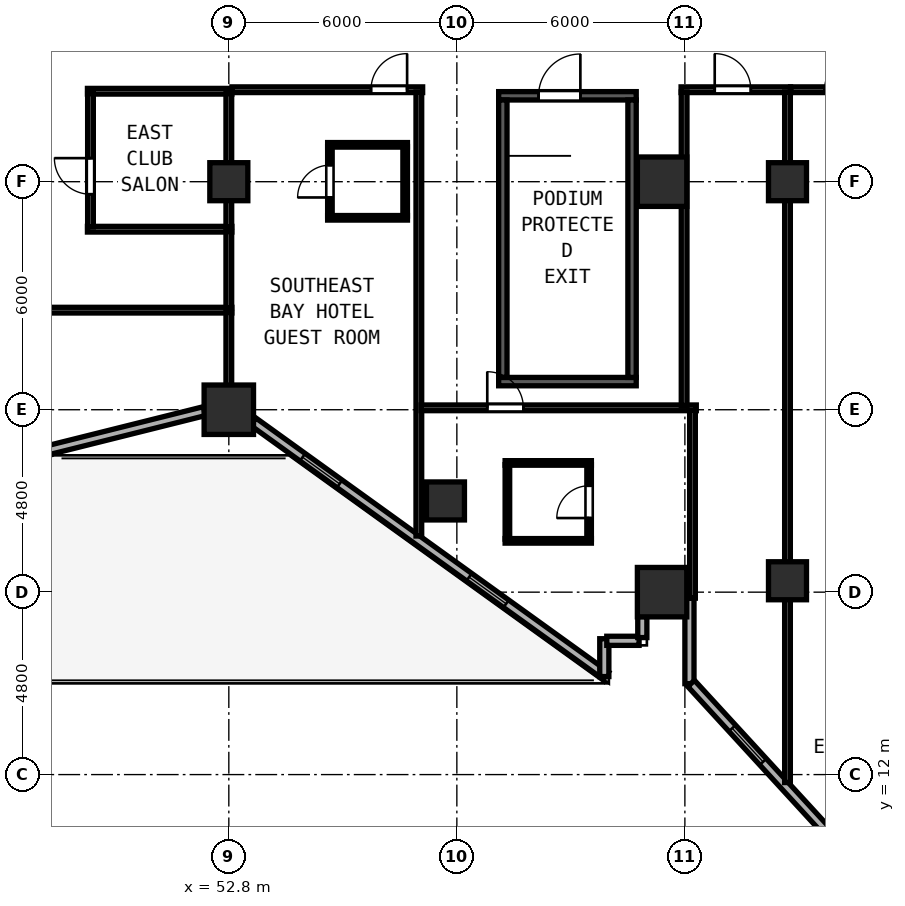
"""IFC4 building model, lengths in metres.
Left out: names, types, materials, properties, quantities, classifications, styles, units other than length and angle.
Written with IfcOpenShell. Run it as: python <this file> out.ifc"""

import sys

from ifc_helpers import new_model, si_unit, direction, frame, frame_2d, origin, origin_2d, place, context, subcontext, project, spatial, rectangle, hollow_rectangle, extrude, element, fill, save


model = new_model("IFC4")
c1 = context("Model", 3, precision=1e-05, world=origin(), true_north=direction((0.0, 1.0)))
c2 = subcontext(c1, "Body", "Model", "MODEL_VIEW")
j1 = project(units=[si_unit("LENGTHUNIT", "METRE"), si_unit("PLANEANGLEUNIT", "RADIAN")], contexts=[c1])
p1 = place(None, origin())
s1 = spatial("IfcSite", under=j1, at=p1, CompositionType="ELEMENT")
p2 = place(p1, origin())
s2 = spatial("IfcBuilding", under=s1, at=p2, CompositionType="ELEMENT")
p3 = place(p2, frame((0.0, 0.0, 24.0)))
s3 = spatial("IfcBuildingStorey", under=s2, at=p3, CompositionType="ELEMENT", Elevation=24.0)
p4 = place(p3, frame((59.9, 29.86, 0.0), z_axis=(0.0, 0.0, 1.0), x_axis=(1.0, 0.0, 0.0)))
e1 = element("IfcWall", 1, at=p4, inside=s3, PredefinedType="SHEAR", context=c2, shape_type="SweptSolid", body=[
    extrude(rectangle(XDim=3.62, YDim=0.22, at=frame_2d((1.81, 0.0))), origin(), (0.0, 0.0, 1.0), 3.6),
])
p5 = place(p4, frame((1.05, 0.0, 0.0)))
e2 = element("IfcOpeningElement", 2, at=p5, cuts=e1, PredefinedType="OPENING", context=c2, shape_type="SweptSolid", body=[
    extrude(rectangle(XDim=1.1, YDim=2.15, at=frame_2d((0.55, 1.075))), frame((0.0, 0.12, 0.0), z_axis=(0.0, -1.0, 0.0), x_axis=(1.0, 0.0, 0.0)), (0.0, 0.0, 1.0), 0.24),
])
p6 = place(p3, frame((59.9, 22.34, 0.0), z_axis=(0.0, 0.0, 1.0), x_axis=(1.0, 0.0, 0.0)))
e3 = element("IfcWall", 3, at=p6, inside=s3, PredefinedType="SHEAR", context=c2, shape_type="SweptSolid", body=[
    extrude(rectangle(XDim=3.62, YDim=0.22, at=frame_2d((1.81, 0.0))), origin(), (0.0, 0.0, 1.0), 3.6),
])
for number, where, z_axis, x_axis in (
    (4, (60.01, 22.45, 0.0), (0.0, 0.0, 1.0), (0.0, 1.0, 0.0)),
    (5, (63.41, 22.45, 0.0), (0.0, 0.0, 1.0), (0.0, 1.0, 0.0)),
):
    element("IfcWall", number, at=place(p3, frame(where, z_axis=z_axis, x_axis=x_axis)), inside=s3, PredefinedType="SHEAR", context=c2, shape_type="SweptSolid", body=[
        extrude(rectangle(XDim=7.3, YDim=0.22, at=frame_2d((3.65, 0.0))), origin(), (0.0, 0.0, 1.0), 3.6),
    ])
for number, where, z_axis, x_axis in (
    (6, (52.8, 21.6, 0.0), (0.0, 0.0, 1.0), (1.0, 0.0, 0.0)),
    (7, (64.2, 16.8, 0.0), (0.0, 0.0, 1.0), (1.0, 0.0, 0.0)),
    (8, (64.2, 27.6, 0.0), (0.0, 0.0, 1.0), (1.0, 0.0, 0.0)),
):
    element("IfcColumn", number, at=place(p3, frame(where, z_axis=z_axis, x_axis=x_axis)), inside=s3, PredefinedType="COLUMN", context=c2, shape_type="SweptSolid", body=[
        extrude(hollow_rectangle(XDim=1.3, YDim=1.3, WallThickness=0.048, at=origin_2d()), origin(), (0.0, 0.0, 1.0), 3.8),
    ])
for number, where, z_axis, x_axis in (
    (9, (52.8, 27.6, -0.26), (0.0, 0.0, 1.0), (1.0, 0.0, 0.0)),
    (10, (58.5, 19.2, -0.26), (0.0, 0.0, 1.0), (1.0, 0.0, 0.0)),
    (11, (67.5, 17.1, -0.26), (0.0, 0.0, 1.0), (1.0, 0.0, 0.0)),
    (12, (67.5, 27.6, -0.26), (0.0, 0.0, 1.0), (1.0, 0.0, 0.0)),
):
    element("IfcColumn", number, at=place(p3, frame(where, z_axis=z_axis, x_axis=x_axis)), inside=s3, PredefinedType="COLUMN", context=c2, shape_type="SweptSolid", body=[
        extrude(hollow_rectangle(XDim=1.0, YDim=1.0, WallThickness=0.038, at=origin_2d()), origin(), (0.0, 0.0, 1.0), 4.06),
    ])
p7 = place(p3, frame((47.932, 20.507, 0.0), z_axis=(0.0, 0.0, 1.0), x_axis=(0.970135906278, 0.242561998982, 0.0)))
e13 = element("IfcWall", 13, at=p7, inside=s3, PredefinedType="SOLIDWALL", context=c2, shape_type="SweptSolid", body=[
    extrude(rectangle(XDim=4.356, YDim=0.24, at=frame_2d((2.178, 0.0))), origin(), (0.0, 0.0, 1.0), 3.097),
])
p8 = place(p3, frame((53.442, 21.286, 0.0), z_axis=(0.0, 0.0, 1.0), x_axis=(0.811542842993, -0.584292917967, 0.0)))
e14 = element("IfcWall", 14, at=p8, inside=s3, PredefinedType="SOLIDWALL", context=c2, shape_type="SweptSolid", body=[
    extrude(rectangle(XDim=11.438, YDim=0.24, at=frame_2d((5.719, 0.0))), origin(), (0.0, 0.0, 1.0), 3.097),
])
p9 = place(p8, frame((1.6, 0.0, 0.85)))
e15 = element("IfcOpeningElement", 15, at=p9, cuts=e14, PredefinedType="OPENING", context=c2, shape_type="SweptSolid", body=[
    extrude(rectangle(XDim=1.2, YDim=1.85, at=frame_2d((0.6, 0.925))), frame((0.0, 0.13, 0.0), z_axis=(0.0, -1.0, 0.0), x_axis=(1.0, 0.0, 0.0)), (0.0, 0.0, 1.0), 0.26),
])
p10 = place(p8, frame((7.0, 0.0, 0.85)))
e16 = element("IfcOpeningElement", 16, at=p10, cuts=e14, PredefinedType="OPENING", context=c2, shape_type="SweptSolid", body=[
    extrude(rectangle(XDim=1.2, YDim=1.85, at=frame_2d((0.6, 0.925))), frame((0.0, 0.13, 0.0), z_axis=(0.0, -1.0, 0.0), x_axis=(1.0, 0.0, 0.0)), (0.0, 0.0, 1.0), 0.26),
])
p11 = place(p3, frame((62.68, 14.579, 0.0), z_axis=(0.0, 0.0, 1.0), x_axis=(0.0, 1.0, 0.0)))
e17 = element("IfcWall", 17, at=p11, inside=s3, PredefinedType="SOLIDWALL", context=c2, shape_type="SweptSolid", body=[
    extrude(rectangle(XDim=0.996, YDim=0.24, at=frame_2d((0.498, 0.0))), origin(), (0.0, 0.0, 1.0), 3.6),
])
p12 = place(p3, frame((62.745, 15.52, 0.0), z_axis=(0.0, 0.0, 1.0), x_axis=(1.0, 0.0, 0.0)))
e18 = element("IfcWall", 18, at=p12, inside=s3, PredefinedType="SOLIDWALL", context=c2, shape_type="SweptSolid", body=[
    extrude(rectangle(XDim=0.85, YDim=0.24, at=frame_2d((0.425, 0.0))), origin(), (0.0, 0.0, 1.0), 3.6),
])
p13 = place(p3, frame((63.68, 15.605, 0.0), z_axis=(0.0, 0.0, 1.0), x_axis=(0.0, 1.0, 0.0)))
e19 = element("IfcWall", 19, at=p13, inside=s3, PredefinedType="SOLIDWALL", context=c2, shape_type="SweptSolid", body=[
    extrude(rectangle(XDim=0.553, YDim=0.24, at=frame_2d((0.276, 0.0))), origin(), (0.0, 0.0, 1.0), 3.6),
])
p14 = place(p3, frame((64.92, 16.64, 0.0), z_axis=(0.0, 0.0, 1.0), x_axis=(0.0, -1.0, 0.0)))
e20 = element("IfcWall", 20, at=p14, inside=s3, PredefinedType="SOLIDWALL", context=c2, shape_type="SweptSolid", body=[
    extrude(rectangle(XDim=2.248, YDim=0.24, at=frame_2d((1.124, 0.0))), origin(), (0.0, 0.0, 1.0), 3.6),
])
p15 = place(p3, frame((64.964, 14.399, 0.0), z_axis=(0.0, 0.0, 1.0), x_axis=(0.676144639244, -0.736768910054, 0.0)))
e21 = element("IfcWall", 21, at=p15, inside=s3, PredefinedType="SOLIDWALL", context=c2, shape_type="SweptSolid", body=[
    extrude(rectangle(XDim=9.552, YDim=0.24, at=frame_2d((4.776, 0.0))), origin(), (0.0, 0.0, 1.0), 3.6),
])
p16 = place(p15, frame((1.6, 0.0, 0.85)))
e22 = element("IfcOpeningElement", 22, at=p16, cuts=e21, PredefinedType="OPENING", context=c2, shape_type="SweptSolid", body=[
    extrude(rectangle(XDim=1.2, YDim=1.85, at=frame_2d((0.6, 0.925))), frame((0.0, 0.13, 0.0), z_axis=(0.0, -1.0, 0.0), x_axis=(1.0, 0.0, 0.0)), (0.0, 0.0, 1.0), 0.26),
])
p17 = place(p15, frame((7.0, 0.0, 0.85)))
e23 = element("IfcOpeningElement", 23, at=p17, cuts=e21, PredefinedType="OPENING", context=c2, shape_type="SweptSolid", body=[
    extrude(rectangle(XDim=1.2, YDim=1.85, at=frame_2d((0.6, 0.925))), frame((0.0, 0.13, 0.0), z_axis=(0.0, -1.0, 0.0), x_axis=(1.0, 0.0, 0.0)), (0.0, 0.0, 1.0), 0.26),
])
p18 = place(p3, frame((71.183, 31.078, 0.0), z_axis=(0.0, 0.0, 1.0), x_axis=(-0.936332044214, 0.351115797106, 0.0)))
e24 = element("IfcWall", 24, at=p18, inside=s3, PredefinedType="SOLIDWALL", context=c2, shape_type="SweptSolid", body=[
    extrude(rectangle(XDim=7.0, YDim=0.24, at=frame_2d((3.5, 0.0))), origin(), (0.0, 0.0, 1.0), 3.6),
])
p19 = place(p18, frame((1.6, 0.0, 0.85)))
e25 = element("IfcOpeningElement", 25, at=p19, cuts=e24, PredefinedType="OPENING", context=c2, shape_type="SweptSolid", body=[
    extrude(rectangle(XDim=1.2, YDim=1.85, at=frame_2d((0.6, 0.925))), frame((0.0, 0.13, 0.0), z_axis=(0.0, -1.0, 0.0), x_axis=(1.0, 0.0, 0.0)), (0.0, 0.0, 1.0), 0.26),
])
for number, where, z_axis, x_axis in (
    (26, (49.08, 29.98, 0.0), (0.0, 0.0, 1.0), (1.0, 0.0, 0.0)),
    (27, (49.08, 26.35, 0.0), (0.0, 0.0, 1.0), (1.0, 0.0, 0.0)),
):
    element("IfcWall", number, at=place(p3, frame(where, z_axis=z_axis, x_axis=x_axis)), inside=s3, PredefinedType="PARTITIONING", context=c2, shape_type="SweptSolid", body=[
        extrude(rectangle(XDim=3.8, YDim=0.15, at=frame_2d((1.9, 0.0))), origin(), (0.0, 0.0, 1.0), 3.6),
    ])
p20 = place(p3, frame((49.16, 26.41, 0.0), z_axis=(0.0, 0.0, 1.0), x_axis=(0.0, 1.0, 0.0)))
e28 = element("IfcWall", 28, at=p20, inside=s3, PredefinedType="PARTITIONING", context=c2, shape_type="SweptSolid", body=[
    extrude(rectangle(XDim=3.51, YDim=0.15, at=frame_2d((1.755, 0.0))), origin(), (0.0, 0.0, 1.0), 3.6),
])
p21 = place(p20, frame((0.86, 0.0, 0.0)))
e29 = element("IfcOpeningElement", 29, at=p21, cuts=e28, PredefinedType="OPENING", context=c2, shape_type="SweptSolid", body=[
    extrude(rectangle(XDim=0.95, YDim=2.12, at=frame_2d((0.475, 1.06))), frame((0.0, 0.085, 0.0), z_axis=(0.0, -1.0, 0.0), x_axis=(1.0, 0.0, 0.0)), (0.0, 0.0, 1.0), 0.17),
])
p22 = place(p3, frame((52.8, 26.41, 0.0), z_axis=(0.0, 0.0, 1.0), x_axis=(0.0, 1.0, 0.0)))
e30 = element("IfcWall", 30, at=p22, inside=s3, PredefinedType="PARTITIONING", context=c2, shape_type="SweptSolid", body=[
    extrude(rectangle(XDim=3.51, YDim=0.15, at=frame_2d((1.755, 0.0))), origin(), (0.0, 0.0, 1.0), 3.097),
])
p23 = place(p3, frame((45.682, 24.22, 0.0), z_axis=(0.0, 0.0, 1.0), x_axis=(1.0, 0.0, 0.0)))
e31 = element("IfcWall", 31, at=p23, inside=s3, PredefinedType="PARTITIONING", context=c2, shape_type="SweptSolid", body=[
    extrude(rectangle(XDim=7.198, YDim=0.15, at=frame_2d((3.599, 0.0))), origin(), (0.0, 0.0, 1.0), 3.6),
])
p24 = place(p23, frame((2.143, 0.0, 0.0), z_axis=(0.0, 0.0, 1.0), x_axis=(-1.0, 0.0, 0.0)))
e32 = element("IfcOpeningElement", 32, at=p24, cuts=e31, PredefinedType="OPENING", context=c2, shape_type="SweptSolid", body=[
    extrude(rectangle(XDim=0.95, YDim=2.12, at=frame_2d((0.475, 1.06))), frame((0.0, 0.085, 0.0), z_axis=(0.0, -1.0, 0.0), x_axis=(1.0, 0.0, 0.0)), (0.0, 0.0, 1.0), 0.17),
])
p25 = place(p3, frame((52.8, 21.819, 0.0), z_axis=(0.0, 0.0, 1.0), x_axis=(0.0, 1.0, 0.0)))
e33 = element("IfcWall", 33, at=p25, inside=s3, PredefinedType="PARTITIONING", context=c2, shape_type="SweptSolid", body=[
    extrude(rectangle(XDim=2.341, YDim=0.15, at=frame_2d((1.171, 0.0))), origin(), (0.0, 0.0, 1.0), 3.097),
])
p26 = place(p3, frame((52.882, 30.02, 0.0), z_axis=(0.0, 0.0, 1.0), x_axis=(1.0, 0.0, 0.0)))
e34 = element("IfcWall", 34, at=p26, inside=s3, PredefinedType="PARTITIONING", context=c2, shape_type="SweptSolid", body=[
    extrude(rectangle(XDim=5.018, YDim=0.15, at=frame_2d((2.509, 0.0))), origin(), (0.0, 0.0, 1.0), 3.6),
])
p27 = place(p26, frame((4.609, 0.0, 0.0), z_axis=(0.0, 0.0, 1.0), x_axis=(-1.0, 0.0, 0.0)))
e35 = element("IfcOpeningElement", 35, at=p27, cuts=e34, PredefinedType="OPENING", context=c2, shape_type="SweptSolid", body=[
    extrude(rectangle(XDim=0.95, YDim=2.15, at=frame_2d((0.475, 1.075))), frame((0.0, 0.085, 0.0), z_axis=(0.0, -1.0, 0.0), x_axis=(1.0, 0.0, 0.0)), (0.0, 0.0, 1.0), 0.17),
])
p28 = place(p3, frame((52.8, 24.28, 0.0), z_axis=(0.0, 0.0, 1.0), x_axis=(0.0, 1.0, 0.0)))
e36 = element("IfcWall", 36, at=p28, inside=s3, PredefinedType="PARTITIONING", context=c2, shape_type="SweptSolid", body=[
    extrude(rectangle(XDim=2.01, YDim=0.15, at=frame_2d((1.005, 0.0))), origin(), (0.0, 0.0, 1.0), 3.097),
])
p29 = place(p3, frame((57.8, 18.277, 0.0), z_axis=(0.0, 0.0, 1.0), x_axis=(0.0, 1.0, 0.0)))
e37 = element("IfcWall", 37, at=p29, inside=s3, PredefinedType="PARTITIONING", context=c2, shape_type="SweptSolid", body=[
    extrude(rectangle(XDim=11.683, YDim=0.15, at=frame_2d((5.841, 0.0))), origin(), (0.0, 0.0, 1.0), 3.6),
])
for number, where, z_axis, x_axis in (
    (38, (55.4, 28.57, 0.0), (0.0, 0.0, 1.0), (1.0, 0.0, 0.0)),
    (39, (55.4, 26.65, 0.0), (0.0, 0.0, 1.0), (1.0, 0.0, 0.0)),
):
    element("IfcWall", number, at=place(p3, frame(where, z_axis=z_axis, x_axis=x_axis)), inside=s3, PredefinedType="PARTITIONING", context=c2, shape_type="SweptSolid", body=[
        extrude(rectangle(XDim=2.1, YDim=0.12, at=frame_2d((1.05, 0.0))), origin(), (0.0, 0.0, 1.0), 3.6),
    ])
p30 = place(p3, frame((55.46, 26.695, 0.0), z_axis=(0.0, 0.0, 1.0), x_axis=(0.0, 1.0, 0.0)))
e40 = element("IfcWall", 40, at=p30, inside=s3, PredefinedType="PARTITIONING", context=c2, shape_type="SweptSolid", body=[
    extrude(rectangle(XDim=1.83, YDim=0.12, at=frame_2d((0.915, 0.0))), origin(), (0.0, 0.0, 1.0), 3.6),
])
p31 = place(p30, frame((1.34, 0.0, 0.0), z_axis=(0.0, 0.0, 1.0), x_axis=(-1.0, 0.0, 0.0)))
e41 = element("IfcOpeningElement", 41, at=p31, cuts=e40, PredefinedType="OPENING", context=c2, shape_type="SweptSolid", body=[
    extrude(rectangle(XDim=0.85, YDim=2.1, at=frame_2d((0.425, 1.05))), frame((0.0, 0.07, 0.0), z_axis=(0.0, -1.0, 0.0), x_axis=(1.0, 0.0, 0.0)), (0.0, 0.0, 1.0), 0.14),
])
p32 = place(p3, frame((57.44, 26.695, 0.0), z_axis=(0.0, 0.0, 1.0), x_axis=(0.0, 1.0, 0.0)))
e42 = element("IfcWall", 42, at=p32, inside=s3, PredefinedType="PARTITIONING", context=c2, shape_type="SweptSolid", body=[
    extrude(rectangle(XDim=1.83, YDim=0.12, at=frame_2d((0.915, 0.0))), origin(), (0.0, 0.0, 1.0), 3.6),
])
p33 = place(p3, frame((57.86, 21.65, 0.0), z_axis=(0.0, 0.0, 1.0), x_axis=(1.0, 0.0, 0.0)))
e43 = element("IfcWall", 43, at=p33, inside=s3, PredefinedType="PARTITIONING", context=c2, shape_type="SweptSolid", body=[
    extrude(rectangle(XDim=7.24, YDim=0.15, at=frame_2d((3.62, 0.0))), origin(), (0.0, 0.0, 1.0), 3.6),
])
p34 = place(p33, frame((2.69, 0.0, 0.0), z_axis=(0.0, 0.0, 1.0), x_axis=(-1.0, 0.0, 0.0)))
e44 = element("IfcOpeningElement", 44, at=p34, cuts=e43, PredefinedType="OPENING", context=c2, shape_type="SweptSolid", body=[
    extrude(rectangle(XDim=0.95, YDim=2.15, at=frame_2d((0.475, 1.075))), frame((0.0, 0.085, 0.0), z_axis=(0.0, -1.0, 0.0), x_axis=(1.0, 0.0, 0.0)), (0.0, 0.0, 1.0), 0.17),
])
p35 = place(p3, frame((65.0, 16.642, 0.0), z_axis=(0.0, 0.0, 1.0), x_axis=(0.0, 1.0, 0.0)))
e45 = element("IfcWall", 45, at=p35, inside=s3, PredefinedType="PARTITIONING", context=c2, shape_type="SweptSolid", body=[
    extrude(rectangle(XDim=4.948, YDim=0.15, at=frame_2d((2.474, 0.0))), origin(), (0.0, 0.0, 1.0), 3.6),
])
for number, where, z_axis, x_axis in (
    (46, (60.07, 20.2, 0.0), (0.0, 0.0, 1.0), (1.0, 0.0, 0.0)),
    (47, (60.07, 18.15, 0.0), (0.0, 0.0, 1.0), (1.0, 0.0, 0.0)),
):
    element("IfcWall", number, at=place(p3, frame(where, z_axis=z_axis, x_axis=x_axis)), inside=s3, PredefinedType="PARTITIONING", context=c2, shape_type="SweptSolid", body=[
        extrude(rectangle(XDim=2.27, YDim=0.12, at=frame_2d((1.135, 0.0))), origin(), (0.0, 0.0, 1.0), 3.6),
    ])
p36 = place(p3, frame((60.13, 18.195, 0.0), z_axis=(0.0, 0.0, 1.0), x_axis=(0.0, 1.0, 0.0)))
e48 = element("IfcWall", 48, at=p36, inside=s3, PredefinedType="PARTITIONING", context=c2, shape_type="SweptSolid", body=[
    extrude(rectangle(XDim=1.96, YDim=0.12, at=frame_2d((0.98, 0.0))), origin(), (0.0, 0.0, 1.0), 3.6),
])
p37 = place(p3, frame((62.28, 18.195, 0.0), z_axis=(0.0, 0.0, 1.0), x_axis=(0.0, 1.0, 0.0)))
e49 = element("IfcWall", 49, at=p37, inside=s3, PredefinedType="PARTITIONING", context=c2, shape_type="SweptSolid", body=[
    extrude(rectangle(XDim=1.96, YDim=0.12, at=frame_2d((0.98, 0.0))), origin(), (0.0, 0.0, 1.0), 3.6),
])
p38 = place(p37, frame((0.555, 0.0, 0.0)))
e50 = element("IfcOpeningElement", 50, at=p38, cuts=e49, PredefinedType="OPENING", context=c2, shape_type="SweptSolid", body=[
    extrude(rectangle(XDim=0.85, YDim=2.1, at=frame_2d((0.425, 1.05))), frame((0.0, 0.07, 0.0), z_axis=(0.0, -1.0, 0.0), x_axis=(1.0, 0.0, 0.0)), (0.0, 0.0, 1.0), 0.14),
])
p39 = place(p3, frame((64.7, 30.02, 0.0), z_axis=(0.0, 0.0, 1.0), x_axis=(1.0, 0.0, 0.0)))
e51 = element("IfcWall", 51, at=p39, inside=s3, PredefinedType="PARTITIONING", context=c2, shape_type="SweptSolid", body=[
    extrude(rectangle(XDim=2.88, YDim=0.15, at=frame_2d((1.44, 0.0))), origin(), (0.0, 0.0, 1.0), 3.6),
])
p40 = place(p39, frame((1.835, 0.0, 0.0), z_axis=(0.0, 0.0, 1.0), x_axis=(-1.0, 0.0, 0.0)))
e52 = element("IfcOpeningElement", 52, at=p40, cuts=e51, PredefinedType="OPENING", context=c2, shape_type="SweptSolid", body=[
    extrude(rectangle(XDim=0.95, YDim=2.12, at=frame_2d((0.475, 1.06))), frame((0.0, 0.085, 0.0), z_axis=(0.0, -1.0, 0.0), x_axis=(1.0, 0.0, 0.0)), (0.0, 0.0, 1.0), 0.17),
])
p41 = place(p3, frame((64.78, 21.71, 0.0), z_axis=(0.0, 0.0, 1.0), x_axis=(0.0, 1.0, 0.0)))
e53 = element("IfcWall", 53, at=p41, inside=s3, PredefinedType="PARTITIONING", context=c2, shape_type="SweptSolid", body=[
    extrude(rectangle(XDim=8.25, YDim=0.15, at=frame_2d((4.125, 0.0))), origin(), (0.0, 0.0, 1.0), 3.6),
])
p42 = place(p3, frame((67.5, 11.791, 0.0), z_axis=(0.0, 0.0, 1.0), x_axis=(0.0, 1.0, 0.0)))
e54 = element("IfcWall", 54, at=p42, inside=s3, PredefinedType="PARTITIONING", context=c2, shape_type="SweptSolid", body=[
    extrude(rectangle(XDim=18.169, YDim=0.15, at=frame_2d((9.085, 0.0))), origin(), (0.0, 0.0, 1.0), 3.6),
])
p43 = place(p3, frame((67.582, 30.02, 0.0), z_axis=(0.0, 0.0, 1.0), x_axis=(1.0, 0.0, 0.0)))
e55 = element("IfcWall", 55, at=p43, inside=s3, PredefinedType="PARTITIONING", context=c2, shape_type="SweptSolid", body=[
    extrude(rectangle(XDim=4.394, YDim=0.15, at=frame_2d((2.197, 0.0))), origin(), (0.0, 0.0, 1.0), 3.6),
])
p44 = place(p43, frame((1.844, 0.0, 0.0), z_axis=(0.0, 0.0, 1.0), x_axis=(-1.0, 0.0, 0.0)))
e56 = element("IfcOpeningElement", 56, at=p44, cuts=e55, PredefinedType="OPENING", context=c2, shape_type="SweptSolid", body=[
    extrude(rectangle(XDim=0.95, YDim=2.18, at=frame_2d((0.475, 1.09))), frame((0.0, 0.085, 0.0), z_axis=(0.0, -1.0, 0.0), x_axis=(1.0, 0.0, 0.0)), (0.0, 0.0, 1.0), 0.17),
])
p45 = place(p9, origin())
e57 = element("IfcWindow", 57, at=p45, inside=s3, PartitioningType="SINGLE_PANEL", PredefinedType="WINDOW", context=c2, shape_type="SweptSolid", body=[
    extrude(rectangle(XDim=1.2, YDim=1.85, at=frame_2d((0.6, 0.925))), frame((0.0, 0.03, 0.0), z_axis=(0.0, -1.0, 0.0), x_axis=(1.0, 0.0, 0.0)), (0.0, 0.0, 1.0), 0.06),
])
fill(e15, e57)
p46 = place(p10, origin())
e58 = element("IfcWindow", 58, at=p46, inside=s3, PartitioningType="SINGLE_PANEL", PredefinedType="WINDOW", context=c2, shape_type="SweptSolid", body=[
    extrude(rectangle(XDim=1.2, YDim=1.85, at=frame_2d((0.6, 0.925))), frame((0.0, 0.03, 0.0), z_axis=(0.0, -1.0, 0.0), x_axis=(1.0, 0.0, 0.0)), (0.0, 0.0, 1.0), 0.06),
])
fill(e16, e58)
p47 = place(p16, origin())
e59 = element("IfcWindow", 59, at=p47, inside=s3, PartitioningType="SINGLE_PANEL", PredefinedType="WINDOW", context=c2, shape_type="SweptSolid", body=[
    extrude(rectangle(XDim=1.2, YDim=1.85, at=frame_2d((0.6, 0.925))), frame((0.0, 0.03, 0.0), z_axis=(0.0, -1.0, 0.0), x_axis=(1.0, 0.0, 0.0)), (0.0, 0.0, 1.0), 0.06),
])
fill(e22, e59)
p48 = place(p5, origin())
e60 = element("IfcDoor", 60, at=p48, inside=s3, OperationType="SINGLE_SWING_RIGHT", PredefinedType="DOOR", context=c2, shape_type="SweptSolid", body=[
    extrude(rectangle(XDim=1.1, YDim=2.15, at=frame_2d((0.55, 1.075))), frame((0.0, 0.025, 0.0), z_axis=(0.0, -1.0, 0.0), x_axis=(1.0, 0.0, 0.0)), (0.0, 0.0, 1.0), 0.05),
])
fill(e2, e60)
p49 = place(p21, origin())
e61 = element("IfcDoor", 61, at=p49, inside=s3, OperationType="SINGLE_SWING_RIGHT", PredefinedType="DOOR", context=c2, shape_type="SweptSolid", body=[
    extrude(rectangle(XDim=0.95, YDim=2.12, at=frame_2d((0.475, 1.06))), frame((0.0, 0.025, 0.0), z_axis=(0.0, -1.0, 0.0), x_axis=(1.0, 0.0, 0.0)), (0.0, 0.0, 1.0), 0.05),
])
fill(e29, e61)
p50 = place(p27, origin())
e62 = element("IfcDoor", 62, at=p50, inside=s3, OperationType="SINGLE_SWING_LEFT", PredefinedType="DOOR", context=c2, shape_type="SweptSolid", body=[
    extrude(rectangle(XDim=0.95, YDim=2.15, at=frame_2d((0.475, 1.075))), frame((0.0, 0.025, 0.0), z_axis=(0.0, -1.0, 0.0), x_axis=(1.0, 0.0, 0.0)), (0.0, 0.0, 1.0), 0.05),
])
fill(e35, e62)
p51 = place(p31, origin())
e63 = element("IfcDoor", 63, at=p51, inside=s3, OperationType="SINGLE_SWING_RIGHT", PredefinedType="DOOR", context=c2, shape_type="SweptSolid", body=[
    extrude(rectangle(XDim=0.85, YDim=2.1, at=frame_2d((0.425, 1.05))), frame((0.0, 0.025, 0.0), z_axis=(0.0, -1.0, 0.0), x_axis=(1.0, 0.0, 0.0)), (0.0, 0.0, 1.0), 0.05),
])
fill(e41, e63)
p52 = place(p34, origin())
e64 = element("IfcDoor", 64, at=p52, inside=s3, OperationType="SINGLE_SWING_RIGHT", PredefinedType="DOOR", context=c2, shape_type="SweptSolid", body=[
    extrude(rectangle(XDim=0.95, YDim=2.15, at=frame_2d((0.475, 1.075))), frame((0.0, 0.025, 0.0), z_axis=(0.0, -1.0, 0.0), x_axis=(1.0, 0.0, 0.0)), (0.0, 0.0, 1.0), 0.05),
])
fill(e44, e64)
p53 = place(p38, origin())
e65 = element("IfcDoor", 65, at=p53, inside=s3, OperationType="SINGLE_SWING_LEFT", PredefinedType="DOOR", context=c2, shape_type="SweptSolid", body=[
    extrude(rectangle(XDim=0.85, YDim=2.1, at=frame_2d((0.425, 1.05))), frame((0.0, 0.025, 0.0), z_axis=(0.0, -1.0, 0.0), x_axis=(1.0, 0.0, 0.0)), (0.0, 0.0, 1.0), 0.05),
])
fill(e50, e65)
p54 = place(p40, origin())
e66 = element("IfcDoor", 66, at=p54, inside=s3, OperationType="SINGLE_SWING_RIGHT", PredefinedType="DOOR", context=c2, shape_type="SweptSolid", body=[
    extrude(rectangle(XDim=0.95, YDim=2.12, at=frame_2d((0.475, 1.06))), frame((0.0, 0.025, 0.0), z_axis=(0.0, -1.0, 0.0), x_axis=(1.0, 0.0, 0.0)), (0.0, 0.0, 1.0), 0.05),
])
fill(e52, e66)
p55 = place(p44, origin())
e67 = element("IfcDoor", 67, at=p55, inside=s3, OperationType="SINGLE_SWING_LEFT", PredefinedType="DOOR", context=c2, shape_type="SweptSolid", body=[
    extrude(rectangle(XDim=0.95, YDim=2.18, at=frame_2d((0.475, 1.09))), frame((0.0, 0.025, 0.0), z_axis=(0.0, -1.0, 0.0), x_axis=(1.0, 0.0, 0.0)), (0.0, 0.0, 1.0), 0.05),
])
fill(e56, e67)
save(model, sys.argv[1])
